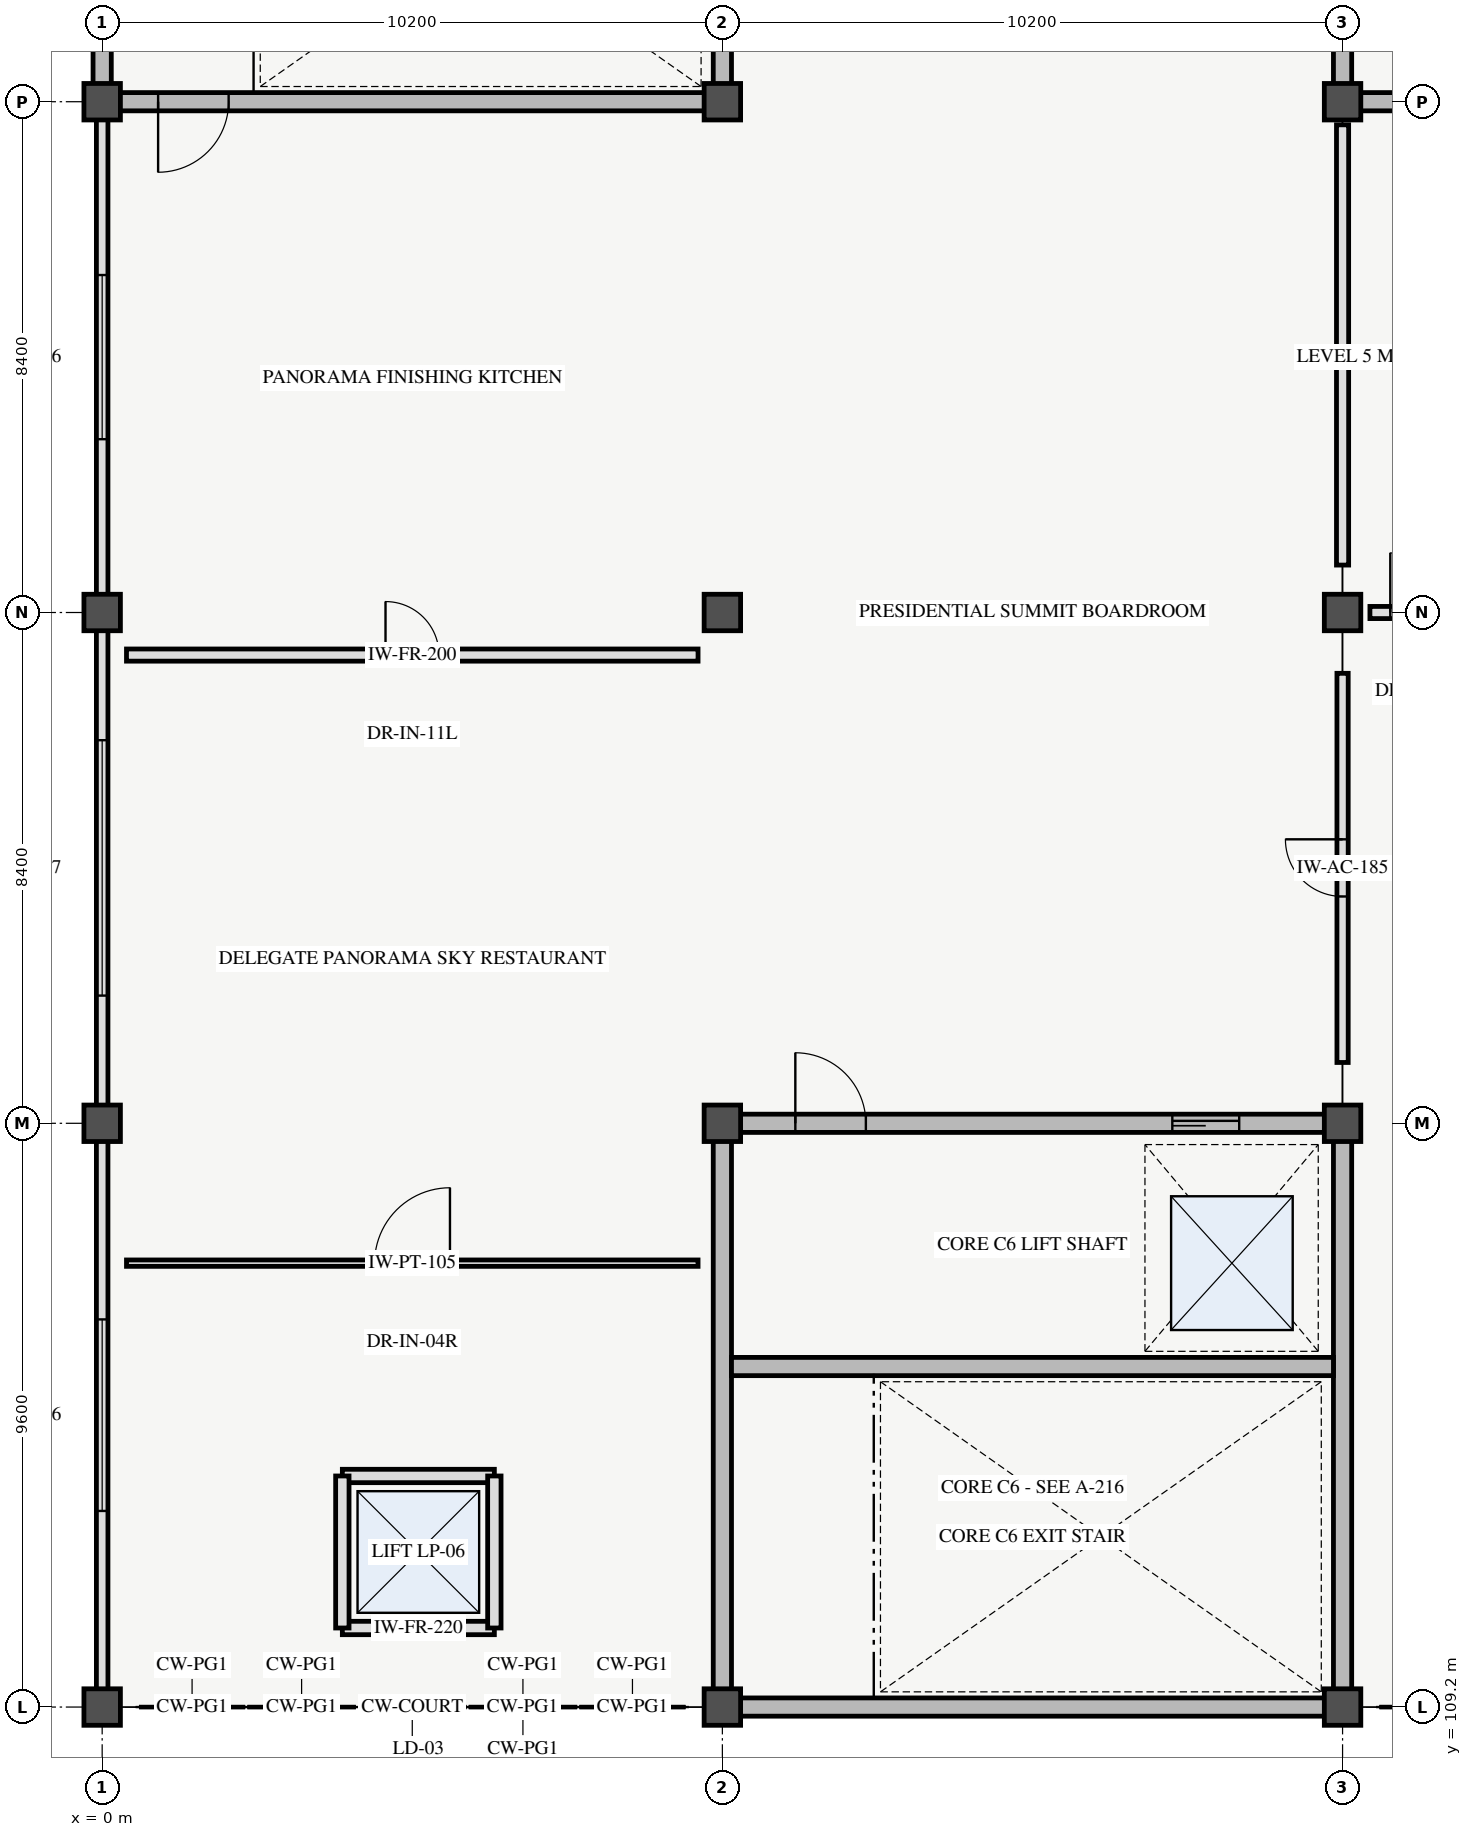
"""IFC4 building model, lengths in metres.
Left out: names, types, materials, properties, quantities, classifications, styles, units other than length and angle.
Written with IfcOpenShell. Run it as: python <this file> out.ifc"""

import sys

from ifc_helpers import new_model, si_unit, direction, frame, frame_2d, origin, origin_2d, place, context, subcontext, project, spatial, rectangle, extrude, element, fill, save


model = new_model("IFC4")
c1 = context("Model", 3, precision=1e-05, world=origin(), true_north=direction((0.0, 1.0)))
c2 = subcontext(c1, "Body", "Model", "MODEL_VIEW")
j1 = project(units=[si_unit("LENGTHUNIT", "METRE"), si_unit("PLANEANGLEUNIT", "RADIAN")], contexts=[c1])
p1 = place(None, origin())
s1 = spatial("IfcSite", under=j1, at=p1, CompositionType="ELEMENT")
p2 = place(p1, origin())
s2 = spatial("IfcBuilding", under=s1, at=p2, CompositionType="ELEMENT")
p3 = place(p2, frame((0.0, 0.0, 23.4)))
s3 = spatial("IfcBuildingStorey", under=s2, at=p3, CompositionType="ELEMENT", Elevation=23.4)
for number, where, z_axis, x_axis in (
    (1, (0.0, 109.2, 0.0), (0.0, 0.0, 1.0), (1.0, 0.0, 0.0)),
    (2, (0.0, 118.8, 0.0), (0.0, 0.0, 1.0), (1.0, 0.0, 0.0)),
    (3, (0.0, 127.2, 0.0), (0.0, 0.0, 1.0), (1.0, 0.0, 0.0)),
    (4, (0.0, 135.6, 0.0), (0.0, 0.0, 1.0), (1.0, 0.0, 0.0)),
    (5, (10.2, 109.2, 0.0), (0.0, 0.0, 1.0), (1.0, 0.0, 0.0)),
    (6, (10.2, 118.8, 0.0), (0.0, 0.0, 1.0), (1.0, 0.0, 0.0)),
    (7, (10.2, 127.2, 0.0), (0.0, 0.0, 1.0), (1.0, 0.0, 0.0)),
    (8, (10.2, 135.6, 0.0), (0.0, 0.0, 1.0), (1.0, 0.0, 0.0)),
    (9, (20.4, 109.2, 0.0), (0.0, 0.0, 1.0), (1.0, 0.0, 0.0)),
    (10, (20.4, 118.8, 0.0), (0.0, 0.0, 1.0), (1.0, 0.0, 0.0)),
    (11, (20.4, 127.2, 0.0), (0.0, 0.0, 1.0), (1.0, 0.0, 0.0)),
    (12, (20.4, 135.6, 0.0), (0.0, 0.0, 1.0), (1.0, 0.0, 0.0)),
):
    element("IfcColumn", number, at=place(p3, frame(where, z_axis=z_axis, x_axis=x_axis)), inside=s3, PredefinedType="COLUMN", context=c2, shape_type="SweptSolid", body=[
        extrude(rectangle(XDim=0.6, YDim=0.6, at=origin_2d()), origin(), (0.0, 0.0, 1.0), 4.2),
    ])
p4 = place(p3, frame((10.2, 109.2, 0.0), z_axis=(0.0, 0.0, 1.0), x_axis=(1.0, 0.0, 0.0)))
e13 = element("IfcWall", 13, at=p4, inside=s3, PredefinedType="SHEAR", context=c2, shape_type="SweptSolid", body=[
    extrude(rectangle(XDim=10.2, YDim=0.3, at=frame_2d((5.1, 0.0))), origin(), (0.0, 0.0, 1.0), 4.2),
])
p5 = place(p3, frame((10.2, 118.8, 0.0), z_axis=(0.0, 0.0, 1.0), x_axis=(1.0, 0.0, 0.0)))
e14 = element("IfcWall", 14, at=p5, inside=s3, PredefinedType="SHEAR", context=c2, shape_type="SweptSolid", body=[
    extrude(rectangle(XDim=10.2, YDim=0.3, at=frame_2d((5.1, 0.0))), origin(), (0.0, 0.0, 1.0), 4.2),
])
p6 = place(p5, frame((1.2, 0.0, 0.0)))
e15 = element("IfcOpeningElement", 15, at=p6, cuts=e14, PredefinedType="OPENING", context=c2, shape_type="SweptSolid", body=[
    extrude(rectangle(XDim=1.16, YDim=2.2, at=frame_2d((0.58, 1.1))), frame((0.0, 0.16, 0.0), z_axis=(0.0, -1.0, 0.0), x_axis=(1.0, 0.0, 0.0)), (0.0, 0.0, 1.0), 0.32),
])
p7 = place(p5, frame((7.4, 0.0, 0.0)))
e16 = element("IfcOpeningElement", 16, at=p7, cuts=e14, PredefinedType="OPENING", context=c2, shape_type="SweptSolid", body=[
    extrude(rectangle(XDim=1.1, YDim=2.2, at=frame_2d((0.55, 1.1))), frame((0.0, 0.16, 0.0), z_axis=(0.0, -1.0, 0.0), x_axis=(1.0, 0.0, 0.0)), (0.0, 0.0, 1.0), 0.32),
])
for number, where, z_axis, x_axis in (
    (17, (10.2, 109.2, 0.0), (0.0, 0.0, 1.0), (0.0, 1.0, 0.0)),
    (18, (20.4, 109.2, 0.0), (0.0, 0.0, 1.0), (0.0, 1.0, 0.0)),
):
    element("IfcWall", number, at=place(p3, frame(where, z_axis=z_axis, x_axis=x_axis)), inside=s3, PredefinedType="SHEAR", context=c2, shape_type="SweptSolid", body=[
        extrude(rectangle(XDim=9.6, YDim=0.3, at=frame_2d((4.8, 0.0))), origin(), (0.0, 0.0, 1.0), 4.2),
    ])
p8 = place(p3, frame((0.0, 109.44, 0.0), z_axis=(0.0, 0.0, 1.0), x_axis=(0.0, 1.0, 0.0)))
e19 = element("IfcWall", 19, at=p8, inside=s3, PredefinedType="STANDARD", context=c2, shape_type="SweptSolid", body=[
    extrude(rectangle(XDim=9.12, YDim=0.19, at=frame_2d((4.56, 0.0))), origin(), (0.0, 0.0, 1.0), 3.06),
])
p9 = place(p8, frame((2.985, 0.0, 0.9)))
e20 = element("IfcOpeningElement", 20, at=p9, cuts=e19, PredefinedType="OPENING", context=c2, shape_type="SweptSolid", body=[
    extrude(rectangle(XDim=3.15, YDim=2.25, at=frame_2d((1.575, 1.125))), frame((0.0, 0.105, 0.0), z_axis=(0.0, -1.0, 0.0), x_axis=(1.0, 0.0, 0.0)), (0.0, 0.0, 1.0), 0.21),
])
p10 = place(p3, frame((0.0, 119.04, 0.0), z_axis=(0.0, 0.0, 1.0), x_axis=(0.0, 1.0, 0.0)))
e21 = element("IfcWall", 21, at=p10, inside=s3, PredefinedType="STANDARD", context=c2, shape_type="SweptSolid", body=[
    extrude(rectangle(XDim=7.92, YDim=0.19, at=frame_2d((3.96, 0.0))), origin(), (0.0, 0.0, 1.0), 3.06),
])
p11 = place(p10, frame((1.86, 0.0, 0.9)))
e22 = element("IfcOpeningElement", 22, at=p11, cuts=e21, PredefinedType="OPENING", context=c2, shape_type="SweptSolid", body=[
    extrude(rectangle(XDim=4.2, YDim=2.1, at=frame_2d((2.1, 1.05))), frame((0.0, 0.105, 0.0), z_axis=(0.0, -1.0, 0.0), x_axis=(1.0, 0.0, 0.0)), (0.0, 0.0, 1.0), 0.21),
])
p12 = place(p3, frame((0.0, 127.44, 0.0), z_axis=(0.0, 0.0, 1.0), x_axis=(0.0, 1.0, 0.0)))
e23 = element("IfcWall", 23, at=p12, inside=s3, PredefinedType="STANDARD", context=c2, shape_type="SweptSolid", body=[
    extrude(rectangle(XDim=7.92, YDim=0.19, at=frame_2d((3.96, 0.0))), origin(), (0.0, 0.0, 1.0), 3.06),
])
p13 = place(p12, frame((2.61, 0.0, 0.9)))
e24 = element("IfcOpeningElement", 24, at=p13, cuts=e23, PredefinedType="OPENING", context=c2, shape_type="SweptSolid", body=[
    extrude(rectangle(XDim=2.7, YDim=1.85, at=frame_2d((1.35, 0.925))), frame((0.0, 0.105, 0.0), z_axis=(0.0, -1.0, 0.0), x_axis=(1.0, 0.0, 0.0)), (0.0, 0.0, 1.0), 0.21),
])
p14 = place(p3, frame((10.35, 114.8, 0.0), z_axis=(0.0, 0.0, 1.0), x_axis=(1.0, 0.0, 0.0)))
e25 = element("IfcWall", 25, at=p14, inside=s3, PredefinedType="SHEAR", context=c2, shape_type="SweptSolid", body=[
    extrude(rectangle(XDim=9.9, YDim=0.3, at=frame_2d((4.95, 0.0))), origin(), (0.0, 0.0, 1.0), 4.2),
])
p15 = place(p3, frame((20.4, 135.6, 0.0), z_axis=(0.0, 0.0, 1.0), x_axis=(1.0, 0.0, 0.0)))
e26 = element("IfcWall", 26, at=p15, inside=s3, PredefinedType="SHEAR", context=c2, shape_type="SweptSolid", body=[
    extrude(rectangle(XDim=10.2, YDim=0.3, at=frame_2d((5.1, 0.0))), origin(), (0.0, 0.0, 1.0), 4.2),
])
p16 = place(p15, frame((0.92, 0.0, 0.0)))
e27 = element("IfcOpeningElement", 27, at=p16, cuts=e26, PredefinedType="OPENING", context=c2, shape_type="SweptSolid", body=[
    extrude(rectangle(XDim=1.16, YDim=2.2, at=frame_2d((0.58, 1.1))), frame((0.0, 0.16, 0.0), z_axis=(0.0, -1.0, 0.0), x_axis=(1.0, 0.0, 0.0)), (0.0, 0.0, 1.0), 0.32),
])
p17 = place(p3, frame((20.4, 135.6, 0.0), z_axis=(0.0, 0.0, 1.0), x_axis=(0.0, 1.0, 0.0)))
e28 = element("IfcWall", 28, at=p17, inside=s3, PredefinedType="SHEAR", context=c2, shape_type="SweptSolid", body=[
    extrude(rectangle(XDim=8.4, YDim=0.3, at=frame_2d((4.2, 0.0))), origin(), (0.0, 0.0, 1.0), 4.2),
])
p18 = place(p3, frame((0.0, 135.6, 0.0), z_axis=(0.0, 0.0, 1.0), x_axis=(1.0, 0.0, 0.0)))
e29 = element("IfcWall", 29, at=p18, inside=s3, PredefinedType="SHEAR", context=c2, shape_type="SweptSolid", body=[
    extrude(rectangle(XDim=10.2, YDim=0.3, at=frame_2d((5.1, 0.0))), origin(), (0.0, 0.0, 1.0), 4.2),
])
p19 = place(p18, frame((0.92, 0.0, 0.0)))
e30 = element("IfcOpeningElement", 30, at=p19, cuts=e29, PredefinedType="OPENING", context=c2, shape_type="SweptSolid", body=[
    extrude(rectangle(XDim=1.16, YDim=2.2, at=frame_2d((0.58, 1.1))), frame((0.0, 0.16, 0.0), z_axis=(0.0, -1.0, 0.0), x_axis=(1.0, 0.0, 0.0)), (0.0, 0.0, 1.0), 0.32),
])
for number, where, z_axis, x_axis in (
    (31, (0.0, 135.6, 0.0), (0.0, 0.0, 1.0), (0.0, 1.0, 0.0)),
    (32, (10.2, 135.6, 0.0), (0.0, 0.0, 1.0), (0.0, 1.0, 0.0)),
):
    element("IfcWall", number, at=place(p3, frame(where, z_axis=z_axis, x_axis=x_axis)), inside=s3, PredefinedType="SHEAR", context=c2, shape_type="SweptSolid", body=[
        extrude(rectangle(XDim=8.4, YDim=0.3, at=frame_2d((4.2, 0.0))), origin(), (0.0, 0.0, 1.0), 4.2),
    ])
p20 = place(p3, frame((3.95, 110.5, 0.0), z_axis=(0.0, 0.0, 1.0), x_axis=(1.0, 0.0, 0.0)))
e33 = element("IfcWall", 33, at=p20, inside=s3, PredefinedType="PARTITIONING", context=c2, shape_type="SweptSolid", body=[
    extrude(rectangle(XDim=2.5, YDim=0.22, at=frame_2d((1.25, 0.0))), origin(), (0.0, 0.0, 1.0), 3.9),
])
p21 = place(p20, frame((0.575, 0.0, 0.0)))
e34 = element("IfcOpeningElement", 34, at=p21, cuts=e33, PredefinedType="OPENING", context=c2, shape_type="SweptSolid", body=[
    extrude(rectangle(XDim=1.35, YDim=2.3, at=frame_2d((0.675, 1.15))), frame((0.0, 0.12, 0.0), z_axis=(0.0, -1.0, 0.0), x_axis=(1.0, 0.0, 0.0)), (0.0, 0.0, 1.0), 0.24),
])
for number, where, z_axis, x_axis in (
    (35, (3.95, 113.0, 0.0), (0.0, 0.0, 1.0), (1.0, 0.0, 0.0)),
    (36, (3.95, 110.5, 0.0), (0.0, 0.0, 1.0), (0.0, 1.0, 0.0)),
    (37, (6.45, 110.5, 0.0), (0.0, 0.0, 1.0), (0.0, 1.0, 0.0)),
):
    element("IfcWall", number, at=place(p3, frame(where, z_axis=z_axis, x_axis=x_axis)), inside=s3, PredefinedType="PARTITIONING", context=c2, shape_type="SweptSolid", body=[
        extrude(rectangle(XDim=2.5, YDim=0.22, at=frame_2d((1.25, 0.0))), origin(), (0.0, 0.0, 1.0), 3.9),
    ])
p22 = place(p3, frame((0.4, 116.5, 0.0), z_axis=(0.0, 0.0, 1.0), x_axis=(1.0, 0.0, 0.0)))
e38 = element("IfcWall", 38, at=p22, inside=s3, PredefinedType="PARTITIONING", context=c2, shape_type="SweptSolid", body=[
    extrude(rectangle(XDim=9.4, YDim=0.105, at=frame_2d((4.7, 0.0))), origin(), (0.0, 0.0, 1.0), 3.06),
])
p23 = place(p22, frame((4.08, 0.0, 0.0)))
e39 = element("IfcOpeningElement", 39, at=p23, cuts=e38, PredefinedType="OPENING", context=c2, shape_type="SweptSolid", body=[
    extrude(rectangle(XDim=1.24, YDim=2.2, at=frame_2d((0.62, 1.1))), frame((0.0, 0.062, 0.0), z_axis=(0.0, -1.0, 0.0), x_axis=(1.0, 0.0, 0.0)), (0.0, 0.0, 1.0), 0.125),
])
p24 = place(p3, frame((0.4, 126.5, 0.0), z_axis=(0.0, 0.0, 1.0), x_axis=(1.0, 0.0, 0.0)))
e40 = element("IfcWall", 40, at=p24, inside=s3, PredefinedType="PARTITIONING", context=c2, shape_type="SweptSolid", body=[
    extrude(rectangle(XDim=9.4, YDim=0.2, at=frame_2d((4.7, 0.0))), origin(), (0.0, 0.0, 1.0), 3.06),
])
p25 = place(p24, frame((4.26, 0.0, 0.0)))
e41 = element("IfcOpeningElement", 41, at=p25, cuts=e40, PredefinedType="OPENING", context=c2, shape_type="SweptSolid", body=[
    extrude(rectangle(XDim=0.88, YDim=2.08, at=frame_2d((0.44, 1.04))), frame((0.0, 0.11, 0.0), z_axis=(0.0, -1.0, 0.0), x_axis=(1.0, 0.0, 0.0)), (0.0, 0.0, 1.0), 0.22),
])
p26 = place(p3, frame((20.4, 119.8, 0.0), z_axis=(0.0, 0.0, 1.0), x_axis=(0.0, 1.0, 0.0)))
e42 = element("IfcWall", 42, at=p26, inside=s3, PredefinedType="PARTITIONING", context=c2, shape_type="SweptSolid", body=[
    extrude(rectangle(XDim=6.4, YDim=0.185, at=frame_2d((3.2, 0.0))), origin(), (0.0, 0.0, 1.0), 3.06),
])
p27 = place(p26, frame((2.73, 0.0, 0.0)))
e43 = element("IfcOpeningElement", 43, at=p27, cuts=e42, PredefinedType="OPENING", context=c2, shape_type="SweptSolid", body=[
    extrude(rectangle(XDim=0.94, YDim=2.08, at=frame_2d((0.47, 1.04))), frame((0.0, 0.103, 0.0), z_axis=(0.0, -1.0, 0.0), x_axis=(1.0, 0.0, 0.0)), (0.0, 0.0, 1.0), 0.205),
])
p28 = place(p3, frame((20.85, 127.2, 0.0), z_axis=(0.0, 0.0, 1.0), x_axis=(1.0, 0.0, 0.0)))
e44 = element("IfcWall", 44, at=p28, inside=s3, PredefinedType="PARTITIONING", context=c2, shape_type="SweptSolid", body=[
    extrude(rectangle(XDim=1.65, YDim=0.2, at=frame_2d((0.825, 0.0))), origin(), (0.0, 0.0, 1.0), 3.06),
])
p29 = place(p28, frame((0.335, 0.0, 0.0)))
e45 = element("IfcOpeningElement", 45, at=p29, cuts=e44, PredefinedType="OPENING", context=c2, shape_type="SweptSolid", body=[
    extrude(rectangle(XDim=0.98, YDim=2.12, at=frame_2d((0.49, 1.06))), frame((0.0, 0.11, 0.0), z_axis=(0.0, -1.0, 0.0), x_axis=(1.0, 0.0, 0.0)), (0.0, 0.0, 1.0), 0.22),
])
p30 = place(p3, frame((20.4, 127.98, 0.0), z_axis=(0.0, 0.0, 1.0), x_axis=(0.0, 1.0, 0.0)))
e46 = element("IfcWall", 46, at=p30, inside=s3, PredefinedType="PARTITIONING", context=c2, shape_type="SweptSolid", body=[
    extrude(rectangle(XDim=7.24, YDim=0.2, at=frame_2d((3.62, 0.0))), origin(), (0.0, 0.0, 1.0), 3.06),
])
p31 = place(p9, origin())
e47 = element("IfcWindow", 47, at=p31, inside=s3, PartitioningType="TRIPLE_PANEL_VERTICAL", PredefinedType="WINDOW", context=c2, shape_type="SweptSolid", body=[
    extrude(rectangle(XDim=3.15, YDim=2.25, at=frame_2d((1.575, 1.125))), frame((0.0, 0.03, 0.0), z_axis=(0.0, -1.0, 0.0), x_axis=(1.0, 0.0, 0.0)), (0.0, 0.0, 1.0), 0.06),
])
fill(e20, e47)
p32 = place(p11, origin())
e48 = element("IfcWindow", 48, at=p32, inside=s3, PartitioningType="TRIPLE_PANEL_VERTICAL", PredefinedType="WINDOW", context=c2, shape_type="SweptSolid", body=[
    extrude(rectangle(XDim=4.2, YDim=2.1, at=frame_2d((2.1, 1.05))), frame((0.0, 0.03, 0.0), z_axis=(0.0, -1.0, 0.0), x_axis=(1.0, 0.0, 0.0)), (0.0, 0.0, 1.0), 0.06),
])
fill(e22, e48)
p33 = place(p13, origin())
e49 = element("IfcWindow", 49, at=p33, inside=s3, PartitioningType="TRIPLE_PANEL_VERTICAL", PredefinedType="WINDOW", context=c2, shape_type="SweptSolid", body=[
    extrude(rectangle(XDim=2.7, YDim=1.85, at=frame_2d((1.35, 0.925))), frame((0.0, 0.03, 0.0), z_axis=(0.0, -1.0, 0.0), x_axis=(1.0, 0.0, 0.0)), (0.0, 0.0, 1.0), 0.06),
])
fill(e24, e49)
p34 = place(p6, origin())
e50 = element("IfcDoor", 50, at=p34, inside=s3, OperationType="SINGLE_SWING_LEFT", PredefinedType="DOOR", context=c2, shape_type="SweptSolid", body=[
    extrude(rectangle(XDim=1.16, YDim=2.2, at=frame_2d((0.58, 1.1))), frame((0.0, 0.025, 0.0), z_axis=(0.0, -1.0, 0.0), x_axis=(1.0, 0.0, 0.0)), (0.0, 0.0, 1.0), 0.05),
])
fill(e15, e50)
p35 = place(p7, origin())
e51 = element("IfcDoor", 51, at=p35, inside=s3, OperationType="SLIDING_TO_RIGHT", PredefinedType="DOOR", context=c2, shape_type="SweptSolid", body=[
    extrude(rectangle(XDim=1.1, YDim=2.2, at=frame_2d((0.55, 1.1))), frame((0.0, 0.025, 0.0), z_axis=(0.0, -1.0, 0.0), x_axis=(1.0, 0.0, 0.0)), (0.0, 0.0, 1.0), 0.05),
])
fill(e16, e51)
p36 = place(p19, origin())
e52 = element("IfcDoor", 52, at=p36, inside=s3, OperationType="SINGLE_SWING_LEFT", PredefinedType="DOOR", context=c2, shape_type="SweptSolid", body=[
    extrude(rectangle(XDim=1.16, YDim=2.2, at=frame_2d((0.58, 1.1))), frame((0.0, 0.025, 0.0), z_axis=(0.0, -1.0, 0.0), x_axis=(1.0, 0.0, 0.0)), (0.0, 0.0, 1.0), 0.05),
])
fill(e30, e52)
p37 = place(p21, origin())
e53 = element("IfcDoor", 53, at=p37, inside=s3, OperationType="DOUBLE_DOOR_SLIDING", PredefinedType="DOOR", context=c2, shape_type="SweptSolid", body=[
    extrude(rectangle(XDim=1.35, YDim=2.3, at=frame_2d((0.675, 1.15))), frame((0.0, 0.025, 0.0), z_axis=(0.0, -1.0, 0.0), x_axis=(1.0, 0.0, 0.0)), (0.0, 0.0, 1.0), 0.05),
])
fill(e34, e53)
p38 = place(p23, origin())
e54 = element("IfcDoor", 54, at=p38, inside=s3, OperationType="SINGLE_SWING_RIGHT", PredefinedType="DOOR", context=c2, shape_type="SweptSolid", body=[
    extrude(rectangle(XDim=1.24, YDim=2.2, at=frame_2d((0.62, 1.1))), frame((0.0, 0.025, 0.0), z_axis=(0.0, -1.0, 0.0), x_axis=(1.0, 0.0, 0.0)), (0.0, 0.0, 1.0), 0.05),
])
fill(e39, e54)
p39 = place(p25, origin())
e55 = element("IfcDoor", 55, at=p39, inside=s3, OperationType="SINGLE_SWING_LEFT", PredefinedType="DOOR", context=c2, shape_type="SweptSolid", body=[
    extrude(rectangle(XDim=0.88, YDim=2.08, at=frame_2d((0.44, 1.04))), frame((0.0, 0.025, 0.0), z_axis=(0.0, -1.0, 0.0), x_axis=(1.0, 0.0, 0.0)), (0.0, 0.0, 1.0), 0.05),
])
fill(e41, e55)
p40 = place(p27, origin())
e56 = element("IfcDoor", 56, at=p40, inside=s3, OperationType="SINGLE_SWING_RIGHT", PredefinedType="DOOR", context=c2, shape_type="SweptSolid", body=[
    extrude(rectangle(XDim=0.94, YDim=2.08, at=frame_2d((0.47, 1.04))), frame((0.0, 0.025, 0.0), z_axis=(0.0, -1.0, 0.0), x_axis=(1.0, 0.0, 0.0)), (0.0, 0.0, 1.0), 0.05),
])
fill(e43, e56)
p41 = place(p29, origin())
e57 = element("IfcDoor", 57, at=p41, inside=s3, OperationType="SINGLE_SWING_LEFT", PredefinedType="DOOR", context=c2, shape_type="SweptSolid", body=[
    extrude(rectangle(XDim=0.98, YDim=2.12, at=frame_2d((0.49, 1.06))), frame((0.0, 0.025, 0.0), z_axis=(0.0, -1.0, 0.0), x_axis=(1.0, 0.0, 0.0)), (0.0, 0.0, 1.0), 0.05),
])
fill(e45, e57)
save(model, sys.argv[1])
